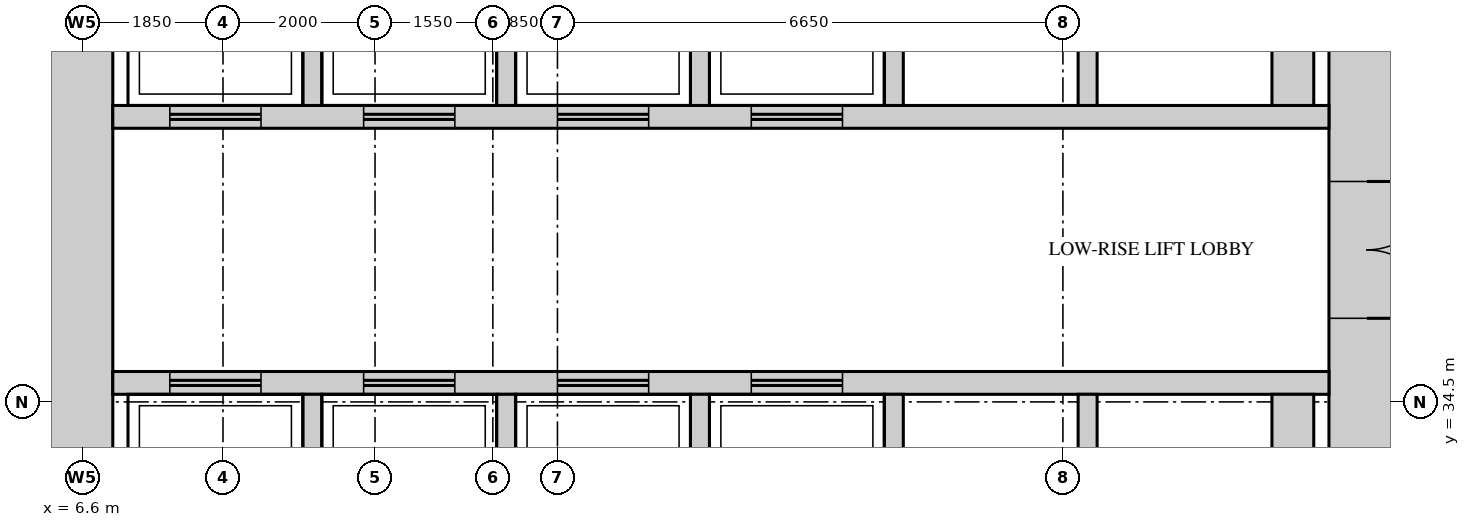
"""IFC4 building model, lengths in metres.
Left out: names, types, materials, properties, quantities, classifications, styles, units other than length and angle.
Written with IfcOpenShell. Run it as: python <this file> out.ifc"""

import sys

from ifc_helpers import new_model, si_unit, direction, frame, frame_2d, origin, place, context, subcontext, project, spatial, rectangle, extrude, source, transform, mapped, element, fill, save


model = new_model("IFC4")
c1 = context("Model", 3, precision=1e-05, world=origin(), true_north=direction((0.0, 1.0)))
c2 = subcontext(c1, "Body", "Model", "MODEL_VIEW")
j1 = project(units=[si_unit("LENGTHUNIT", "METRE"), si_unit("PLANEANGLEUNIT", "RADIAN")], contexts=[c1])
p1 = place(None, origin())
s1 = spatial("IfcSite", under=j1, at=p1, CompositionType="ELEMENT")
p2 = place(p1, origin())
s2 = spatial("IfcBuilding", under=s1, at=p2, CompositionType="ELEMENT")
p3 = place(p2, frame((0.0, 0.0, 114.7)))
s3 = spatial("IfcBuildingStorey", under=s2, at=p3, CompositionType="ELEMENT", Elevation=114.7)
m1 = source(origin(), c2, "Body", "SweptSolid", [
    extrude(rectangle(XDim=28.0, YDim=1.0, at=frame_2d((14.0, 0.0))), origin(), (0.0, 0.0, 1.0), 4.1),
])
p4 = place(p3, frame((23.5, 13.0, 0.0), z_axis=(0.0, 0.0, 1.0), x_axis=(0.0, 1.0, 0.0)))
e1 = element("IfcWall", 1, at=p4, inside=s3, PredefinedType="SHEAR", context=c2, shape_type="MappedRepresentation", body=[
    mapped(m1, transform((0.0, 0.0, 0.0))),
])
m2 = source(origin(), c2, "Body", "SweptSolid", [
    extrude(rectangle(XDim=1.8, YDim=2.1, at=frame_2d((0.9, 1.05))), frame((0.0, 0.51, 0.0), z_axis=(0.0, -1.0, 0.0), x_axis=(1.0, 0.0, 0.0)), (0.0, 0.0, 1.0), 1.02),
])
p5 = place(p4, frame((22.6, 0.0, 0.0)))
e2 = element("IfcOpeningElement", 2, at=p5, cuts=e1, PredefinedType="OPENING", context=c2, shape_type="MappedRepresentation", body=[
    mapped(m2, transform((0.0, 0.0, 0.0))),
])
m3 = source(origin(), c2, "Body", "SweptSolid", [
    extrude(rectangle(XDim=1.2, YDim=2.1, at=frame_2d((0.6, 1.05))), frame((0.0, 0.51, 0.0), z_axis=(0.0, -1.0, 0.0), x_axis=(1.0, 0.0, 0.0)), (0.0, 0.0, 1.0), 1.02),
])
p6 = place(p4, frame((13.85, 0.0, 0.0)))
e3 = element("IfcOpeningElement", 3, at=p6, cuts=e1, PredefinedType="OPENING", context=c2, shape_type="MappedRepresentation", body=[
    mapped(m3, transform((0.0, 0.0, 0.0))),
])
m4 = source(origin(), c2, "Body", "SweptSolid", [
    extrude(rectangle(XDim=0.9, YDim=2.1, at=frame_2d((0.45, 1.05))), frame((0.0, 0.51, 0.0), z_axis=(0.0, -1.0, 0.0), x_axis=(1.0, 0.0, 0.0)), (0.0, 0.0, 1.0), 1.02),
])
p7 = place(p4, frame((2.15, 0.0, 0.0)))
e4 = element("IfcOpeningElement", 4, at=p7, cuts=e1, PredefinedType="OPENING", context=c2, shape_type="MappedRepresentation", body=[
    mapped(m4, transform((0.0, 0.0, 0.0))),
])
p8 = place(p4, frame((7.0, 0.0, 0.0)))
e5 = element("IfcOpeningElement", 5, at=p8, cuts=e1, PredefinedType="OPENING", context=c2, shape_type="MappedRepresentation", body=[
    mapped(m4, transform((0.0, 0.0, 0.0))),
])
p9 = place(p3, frame((6.5, 13.0, 0.0), z_axis=(0.0, 0.0, 1.0), x_axis=(0.0, 1.0, 0.0)))
e6 = element("IfcWall", 6, at=p9, inside=s3, PredefinedType="SHEAR", context=c2, shape_type="MappedRepresentation", body=[
    mapped(m1, transform((0.0, 0.0, 0.0))),
])
m5 = source(origin(), c2, "Body", "SweptSolid", [
    extrude(rectangle(XDim=16.0, YDim=0.3, at=frame_2d((8.0, 0.0))), origin(), (0.0, 0.0, 1.0), 4.1),
])
p10 = place(p3, frame((7.0, 38.25, 0.0), z_axis=(0.0, 0.0, 1.0), x_axis=(1.0, 0.0, 0.0)))
e7 = element("IfcWall", 7, at=p10, inside=s3, PredefinedType="STANDARD", context=c2, shape_type="MappedRepresentation", body=[
    mapped(m5, transform((0.0, 0.0, 0.0))),
])
m6 = source(origin(), c2, "Body", "SweptSolid", [
    extrude(rectangle(XDim=1.2, YDim=2.1, at=frame_2d((0.6, 1.05))), frame((0.0, 0.16, 0.0), z_axis=(0.0, -1.0, 0.0), x_axis=(1.0, 0.0, 0.0)), (0.0, 0.0, 1.0), 0.32),
])
p11 = place(p10, frame((0.75, 0.0, 0.0)))
e8 = element("IfcOpeningElement", 8, at=p11, cuts=e7, PredefinedType="OPENING", context=c2, shape_type="MappedRepresentation", body=[
    mapped(m6, transform((0.0, 0.0, 0.0))),
])
p12 = place(p10, frame((3.3, 0.0, 0.0)))
e9 = element("IfcOpeningElement", 9, at=p12, cuts=e7, PredefinedType="OPENING", context=c2, shape_type="MappedRepresentation", body=[
    mapped(m6, transform((0.0, 0.0, 0.0))),
])
p13 = place(p10, frame((5.85, 0.0, 0.0)))
e10 = element("IfcOpeningElement", 10, at=p13, cuts=e7, PredefinedType="OPENING", context=c2, shape_type="MappedRepresentation", body=[
    mapped(m6, transform((0.0, 0.0, 0.0))),
])
p14 = place(p10, frame((8.4, 0.0, 0.0)))
e11 = element("IfcOpeningElement", 11, at=p14, cuts=e7, PredefinedType="OPENING", context=c2, shape_type="MappedRepresentation", body=[
    mapped(m6, transform((0.0, 0.0, 0.0))),
])
p15 = place(p3, frame((7.0, 34.75, 0.0), z_axis=(0.0, 0.0, 1.0), x_axis=(1.0, 0.0, 0.0)))
e12 = element("IfcWall", 12, at=p15, inside=s3, PredefinedType="STANDARD", context=c2, shape_type="MappedRepresentation", body=[
    mapped(m5, transform((0.0, 0.0, 0.0))),
])
p16 = place(p15, frame((0.75, 0.0, 0.0)))
e13 = element("IfcOpeningElement", 13, at=p16, cuts=e12, PredefinedType="OPENING", context=c2, shape_type="MappedRepresentation", body=[
    mapped(m6, transform((0.0, 0.0, 0.0))),
])
p17 = place(p15, frame((3.3, 0.0, 0.0)))
e14 = element("IfcOpeningElement", 14, at=p17, cuts=e12, PredefinedType="OPENING", context=c2, shape_type="MappedRepresentation", body=[
    mapped(m6, transform((0.0, 0.0, 0.0))),
])
p18 = place(p15, frame((5.85, 0.0, 0.0)))
e15 = element("IfcOpeningElement", 15, at=p18, cuts=e12, PredefinedType="OPENING", context=c2, shape_type="MappedRepresentation", body=[
    mapped(m6, transform((0.0, 0.0, 0.0))),
])
p19 = place(p15, frame((8.4, 0.0, 0.0)))
e16 = element("IfcOpeningElement", 16, at=p19, cuts=e12, PredefinedType="OPENING", context=c2, shape_type="MappedRepresentation", body=[
    mapped(m6, transform((0.0, 0.0, 0.0))),
])
m7 = source(origin(), c2, "Body", "SweptSolid", [
    extrude(rectangle(XDim=2.6, YDim=0.25, at=frame_2d((1.3, 0.0))), origin(), (0.0, 0.0, 1.0), 4.1),
])
for number, where, z_axis, x_axis in (
    (17, (9.625, 38.4, 0.0), (0.0, 0.0, 1.0), (0.0, 1.0, 0.0)),
    (18, (12.175, 38.4, 0.0), (0.0, 0.0, 1.0), (0.0, 1.0, 0.0)),
    (19, (14.725, 38.4, 0.0), (0.0, 0.0, 1.0), (0.0, 1.0, 0.0)),
    (20, (17.275, 38.4, 0.0), (0.0, 0.0, 1.0), (0.0, 1.0, 0.0)),
    (21, (19.825, 38.4, 0.0), (0.0, 0.0, 1.0), (0.0, 1.0, 0.0)),
):
    element("IfcWall", number, at=place(p3, frame(where, z_axis=z_axis, x_axis=x_axis)), inside=s3, PredefinedType="STANDARD", context=c2, shape_type="MappedRepresentation", body=[
        mapped(m7, transform((0.0, 0.0, 0.0))),
    ])
m8 = source(origin(), c2, "Body", "SweptSolid", [
    extrude(rectangle(XDim=2.6, YDim=0.55, at=frame_2d((1.3, 0.0))), origin(), (0.0, 0.0, 1.0), 4.1),
])
p20 = place(p3, frame((22.525, 38.4, 0.0), z_axis=(0.0, 0.0, 1.0), x_axis=(0.0, 1.0, 0.0)))
e22 = element("IfcWall", 22, at=p20, inside=s3, PredefinedType="STANDARD", context=c2, shape_type="MappedRepresentation", body=[
    mapped(m8, transform((0.0, 0.0, 0.0))),
])
m9 = source(origin(), c2, "Body", "SweptSolid", [
    extrude(rectangle(XDim=2.4, YDim=0.25, at=frame_2d((1.2, 0.0))), origin(), (0.0, 0.0, 1.0), 4.1),
])
for number, where, z_axis, x_axis in (
    (23, (9.625, 32.2, 0.0), (0.0, 0.0, 1.0), (0.0, 1.0, 0.0)),
    (24, (12.175, 32.2, 0.0), (0.0, 0.0, 1.0), (0.0, 1.0, 0.0)),
    (25, (14.725, 32.2, 0.0), (0.0, 0.0, 1.0), (0.0, 1.0, 0.0)),
    (26, (17.275, 32.2, 0.0), (0.0, 0.0, 1.0), (0.0, 1.0, 0.0)),
    (27, (19.825, 32.2, 0.0), (0.0, 0.0, 1.0), (0.0, 1.0, 0.0)),
):
    element("IfcWall", number, at=place(p3, frame(where, z_axis=z_axis, x_axis=x_axis)), inside=s3, PredefinedType="STANDARD", context=c2, shape_type="MappedRepresentation", body=[
        mapped(m9, transform((0.0, 0.0, 0.0))),
    ])
m10 = source(origin(), c2, "Body", "SweptSolid", [
    extrude(rectangle(XDim=2.4, YDim=0.55, at=frame_2d((1.2, 0.0))), origin(), (0.0, 0.0, 1.0), 4.1),
])
p21 = place(p3, frame((22.525, 32.2, 0.0), z_axis=(0.0, 0.0, 1.0), x_axis=(0.0, 1.0, 0.0)))
e28 = element("IfcWall", 28, at=p21, inside=s3, PredefinedType="STANDARD", context=c2, shape_type="MappedRepresentation", body=[
    mapped(m10, transform((0.0, 0.0, 0.0))),
])
m11 = source(origin(), c2, "Body", "SweptSolid", [
    extrude(rectangle(XDim=1.8, YDim=2.1, at=frame_2d((0.9, 1.05))), frame((0.0, 0.45, 0.0), z_axis=(0.0, -1.0, 0.0), x_axis=(1.0, 0.0, 0.0)), (0.0, 0.0, 1.0), 0.9),
])
p22 = place(p5, origin())
e29 = element("IfcDoor", 29, at=p22, inside=s3, OperationType="DOUBLE_DOOR_SINGLE_SWING", PredefinedType="DOOR", context=c2, shape_type="MappedRepresentation", body=[
    mapped(m11, transform((0.0, 0.0, 0.0))),
])
fill(e2, e29)
m12 = source(origin(), c2, "Body", "SweptSolid", [
    extrude(rectangle(XDim=1.2, YDim=2.1, at=frame_2d((0.6, 1.05))), frame((0.0, 0.025, 0.0), z_axis=(0.0, -1.0, 0.0), x_axis=(1.0, 0.0, 0.0)), (0.0, 0.0, 1.0), 0.05),
])
p23 = place(p16, origin())
e30 = element("IfcDoor", 30, at=p23, inside=s3, OperationType="DOUBLE_DOOR_SLIDING", PredefinedType="DOOR", context=c2, shape_type="MappedRepresentation", body=[
    mapped(m12, transform((0.0, 0.0, 0.0))),
])
fill(e13, e30)
p24 = place(p17, origin())
e31 = element("IfcDoor", 31, at=p24, inside=s3, OperationType="DOUBLE_DOOR_SLIDING", PredefinedType="DOOR", context=c2, shape_type="MappedRepresentation", body=[
    mapped(m12, transform((0.0, 0.0, 0.0))),
])
fill(e14, e31)
p25 = place(p18, origin())
e32 = element("IfcDoor", 32, at=p25, inside=s3, OperationType="DOUBLE_DOOR_SLIDING", PredefinedType="DOOR", context=c2, shape_type="MappedRepresentation", body=[
    mapped(m12, transform((0.0, 0.0, 0.0))),
])
fill(e15, e32)
p26 = place(p19, origin())
e33 = element("IfcDoor", 33, at=p26, inside=s3, OperationType="DOUBLE_DOOR_SLIDING", PredefinedType="DOOR", context=c2, shape_type="MappedRepresentation", body=[
    mapped(m12, transform((0.0, 0.0, 0.0))),
])
fill(e16, e33)
p27 = place(p11, origin())
e34 = element("IfcDoor", 34, at=p27, inside=s3, OperationType="DOUBLE_DOOR_SLIDING", PredefinedType="DOOR", context=c2, shape_type="MappedRepresentation", body=[
    mapped(m12, transform((0.0, 0.0, 0.0))),
])
fill(e8, e34)
p28 = place(p12, origin())
e35 = element("IfcDoor", 35, at=p28, inside=s3, OperationType="DOUBLE_DOOR_SLIDING", PredefinedType="DOOR", context=c2, shape_type="MappedRepresentation", body=[
    mapped(m12, transform((0.0, 0.0, 0.0))),
])
fill(e9, e35)
p29 = place(p13, origin())
e36 = element("IfcDoor", 36, at=p29, inside=s3, OperationType="DOUBLE_DOOR_SLIDING", PredefinedType="DOOR", context=c2, shape_type="MappedRepresentation", body=[
    mapped(m12, transform((0.0, 0.0, 0.0))),
])
fill(e10, e36)
p30 = place(p14, origin())
e37 = element("IfcDoor", 37, at=p30, inside=s3, OperationType="DOUBLE_DOOR_SLIDING", PredefinedType="DOOR", context=c2, shape_type="MappedRepresentation", body=[
    mapped(m12, transform((0.0, 0.0, 0.0))),
])
fill(e11, e37)
save(model, sys.argv[1])
